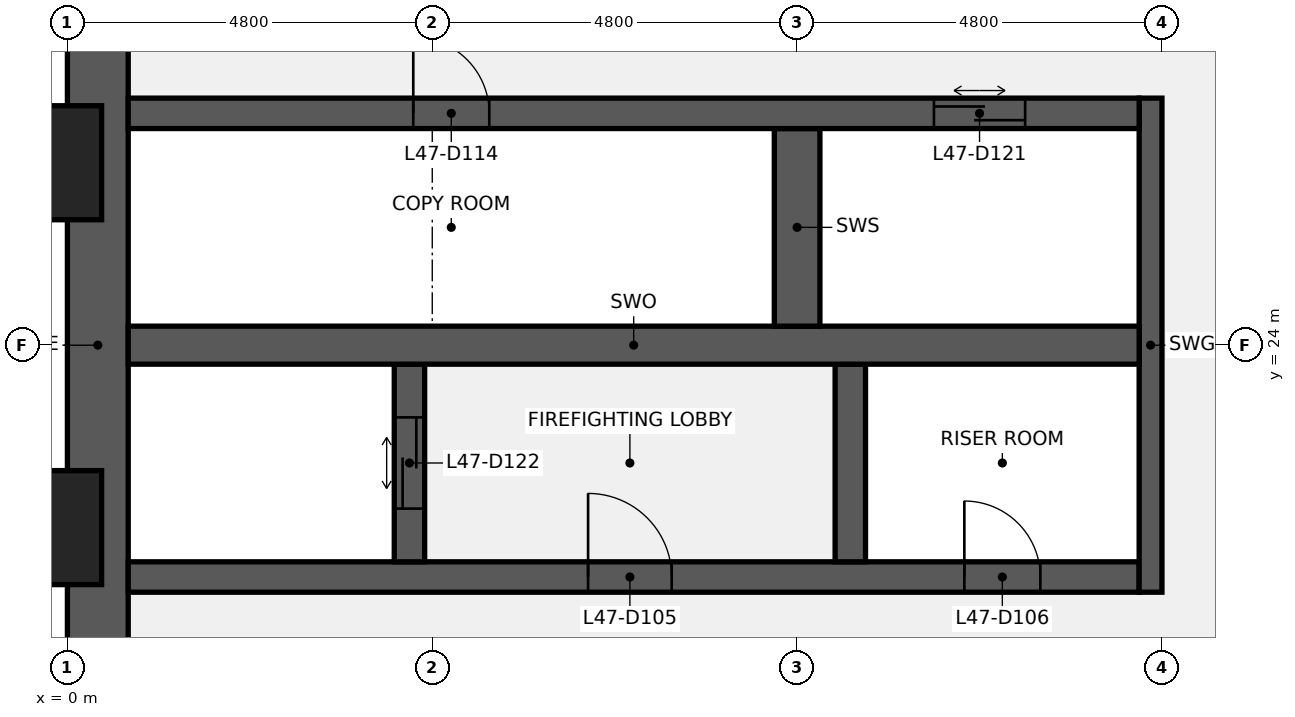
"""IFC4 building model, lengths in metres.
Left out: names, types, materials, properties, quantities, classifications, styles, units other than length and angle.
Written with IfcOpenShell. Run it as: python <this file> out.ifc"""

import sys

from ifc_helpers import new_model, si_unit, direction, frame, frame_2d, origin, origin_2d, place, context, subcontext, project, spatial, rectangle, extrude, element, fill, save


model = new_model("IFC4")
c1 = context("Model", 3, precision=1e-05, world=origin(), true_north=direction((0.0, 1.0)))
c2 = subcontext(c1, "Body", "Model", "MODEL_VIEW")
j1 = project(units=[si_unit("LENGTHUNIT", "METRE"), si_unit("PLANEANGLEUNIT", "RADIAN")], contexts=[c1])
p1 = place(None, origin())
s1 = spatial("IfcSite", under=j1, at=p1, CompositionType="ELEMENT")
p2 = place(p1, origin())
s2 = spatial("IfcBuilding", under=s1, at=p2, CompositionType="ELEMENT")
p3 = place(p2, frame((0.0, 0.0, 217.2)))
s3 = spatial("IfcBuildingStorey", under=s2, at=p3, CompositionType="ELEMENT", Elevation=217.2)
p4 = place(p3, frame((0.4, 9.6, 0.0), z_axis=(0.0, 0.0, 1.0), x_axis=(0.0, 1.0, 0.0)))
e1 = element("IfcWall", 1, at=p4, inside=s3, PredefinedType="SHEAR", context=c2, shape_type="SweptSolid", body=[
    extrude(rectangle(XDim=28.8, YDim=0.8, at=frame_2d((14.4, 0.0))), origin(), (0.0, 0.0, 1.0), 3.84),
])
p5 = place(p4, frame((8.85, 0.0, 0.9)))
e2 = element("IfcOpeningElement", 2, at=p5, cuts=e1, PredefinedType="OPENING", context=c2, shape_type="SweptSolid", body=[
    extrude(rectangle(XDim=1.5, YDim=1.5, at=frame_2d((0.75, 0.75))), frame((0.0, 0.41, 0.0), z_axis=(0.0, -1.0, 0.0), x_axis=(1.0, 0.0, 0.0)), (0.0, 0.0, 1.0), 0.82),
])
p6 = place(p4, frame((18.45, 0.0, 0.9)))
e3 = element("IfcOpeningElement", 3, at=p6, cuts=e1, PredefinedType="OPENING", context=c2, shape_type="SweptSolid", body=[
    extrude(rectangle(XDim=1.5, YDim=1.5, at=frame_2d((0.75, 0.75))), frame((0.0, 0.41, 0.0), z_axis=(0.0, -1.0, 0.0), x_axis=(1.0, 0.0, 0.0)), (0.0, 0.0, 1.0), 0.82),
])
p7 = place(p3, frame((0.8, 20.95, 0.0), z_axis=(0.0, 0.0, 1.0), x_axis=(1.0, 0.0, 0.0)))
e4 = element("IfcWall", 4, at=p7, inside=s3, PredefinedType="SHEAR", context=c2, shape_type="SweptSolid", body=[
    extrude(rectangle(XDim=13.3, YDim=0.4, at=frame_2d((6.65, 0.0))), origin(), (0.0, 0.0, 1.0), 3.84),
])
p8 = place(p7, frame((6.05, 0.0, 0.0)))
e5 = element("IfcOpeningElement", 5, at=p8, cuts=e4, PredefinedType="OPENING", context=c2, shape_type="SweptSolid", body=[
    extrude(rectangle(XDim=1.1, YDim=2.1, at=frame_2d((0.55, 1.05))), frame((0.0, 0.21, 0.0), z_axis=(0.0, -1.0, 0.0), x_axis=(1.0, 0.0, 0.0)), (0.0, 0.0, 1.0), 0.42),
])
p9 = place(p7, frame((11.0, 0.0, 0.0)))
e6 = element("IfcOpeningElement", 6, at=p9, cuts=e4, PredefinedType="OPENING", context=c2, shape_type="SweptSolid", body=[
    extrude(rectangle(XDim=1.0, YDim=2.1, at=frame_2d((0.5, 1.05))), frame((0.0, 0.21, 0.0), z_axis=(0.0, -1.0, 0.0), x_axis=(1.0, 0.0, 0.0)), (0.0, 0.0, 1.0), 0.42),
])
p10 = place(p3, frame((14.25, 20.75, 0.0), z_axis=(0.0, 0.0, 1.0), x_axis=(0.0, 1.0, 0.0)))
e7 = element("IfcWall", 7, at=p10, inside=s3, PredefinedType="SHEAR", context=c2, shape_type="SweptSolid", body=[
    extrude(rectangle(XDim=6.5, YDim=0.3, at=frame_2d((3.25, 0.0))), origin(), (0.0, 0.0, 1.0), 3.84),
])
p11 = place(p3, frame((4.5, 21.15, 0.0), z_axis=(0.0, 0.0, 1.0), x_axis=(0.0, 1.0, 0.0)))
e8 = element("IfcWall", 8, at=p11, inside=s3, PredefinedType="SHEAR", context=c2, shape_type="SweptSolid", body=[
    extrude(rectangle(XDim=2.6, YDim=0.4, at=frame_2d((1.3, 0.0))), origin(), (0.0, 0.0, 1.0), 3.84),
])
p12 = place(p11, frame((0.7, 0.0, 0.0)))
e9 = element("IfcOpeningElement", 9, at=p12, cuts=e8, PredefinedType="OPENING", context=c2, shape_type="SweptSolid", body=[
    extrude(rectangle(XDim=1.2, YDim=2.1, at=frame_2d((0.6, 1.05))), frame((0.0, 0.21, 0.0), z_axis=(0.0, -1.0, 0.0), x_axis=(1.0, 0.0, 0.0)), (0.0, 0.0, 1.0), 0.42),
])
p13 = place(p3, frame((10.3, 21.15, 0.0), z_axis=(0.0, 0.0, 1.0), x_axis=(0.0, 1.0, 0.0)))
e10 = element("IfcWall", 10, at=p13, inside=s3, PredefinedType="SHEAR", context=c2, shape_type="SweptSolid", body=[
    extrude(rectangle(XDim=2.6, YDim=0.4, at=frame_2d((1.3, 0.0))), origin(), (0.0, 0.0, 1.0), 3.84),
])
p14 = place(p3, frame((0.8, 24.0, 0.0), z_axis=(0.0, 0.0, 1.0), x_axis=(1.0, 0.0, 0.0)))
e11 = element("IfcWall", 11, at=p14, inside=s3, PredefinedType="SHEAR", context=c2, shape_type="SweptSolid", body=[
    extrude(rectangle(XDim=13.3, YDim=0.5, at=frame_2d((6.65, 0.0))), origin(), (0.0, 0.0, 1.0), 3.84),
])
p15 = place(p3, frame((9.6, 24.25, 0.0), z_axis=(0.0, 0.0, 1.0), x_axis=(0.0, 1.0, 0.0)))
e12 = element("IfcWall", 12, at=p15, inside=s3, PredefinedType="SHEAR", context=c2, shape_type="SweptSolid", body=[
    extrude(rectangle(XDim=2.6, YDim=0.6, at=frame_2d((1.3, 0.0))), origin(), (0.0, 0.0, 1.0), 3.84),
])
p16 = place(p3, frame((0.8, 27.05, 0.0), z_axis=(0.0, 0.0, 1.0), x_axis=(1.0, 0.0, 0.0)))
e13 = element("IfcWall", 13, at=p16, inside=s3, PredefinedType="SHEAR", context=c2, shape_type="SweptSolid", body=[
    extrude(rectangle(XDim=13.3, YDim=0.4, at=frame_2d((6.65, 0.0))), origin(), (0.0, 0.0, 1.0), 3.84),
])
p17 = place(p16, frame((3.75, 0.0, 0.0)))
e14 = element("IfcOpeningElement", 14, at=p17, cuts=e13, PredefinedType="OPENING", context=c2, shape_type="SweptSolid", body=[
    extrude(rectangle(XDim=1.0, YDim=2.1, at=frame_2d((0.5, 1.05))), frame((0.0, 0.21, 0.0), z_axis=(0.0, -1.0, 0.0), x_axis=(1.0, 0.0, 0.0)), (0.0, 0.0, 1.0), 0.42),
])
p18 = place(p16, frame((10.6, 0.0, 0.0)))
e15 = element("IfcOpeningElement", 15, at=p18, cuts=e13, PredefinedType="OPENING", context=c2, shape_type="SweptSolid", body=[
    extrude(rectangle(XDim=1.2, YDim=2.1, at=frame_2d((0.6, 1.05))), frame((0.0, 0.21, 0.0), z_axis=(0.0, -1.0, 0.0), x_axis=(1.0, 0.0, 0.0)), (0.0, 0.0, 1.0), 0.42),
])
for number, where, z_axis, x_axis in (
    (16, (-0.75, 21.6, 0.0), (0.0, 0.0, 1.0), (0.0, 1.0, 0.0)),
    (17, (-0.75, 26.4, 0.0), (0.0, 0.0, 1.0), (0.0, 1.0, 0.0)),
):
    element("IfcColumn", number, at=place(p3, frame(where, z_axis=z_axis, x_axis=x_axis)), inside=s3, PredefinedType="PILASTER", context=c2, shape_type="SweptSolid", body=[
        extrude(rectangle(XDim=2.4, YDim=1.5, at=origin_2d()), origin(), (0.0, 0.0, 1.0), 4.0),
    ])
p19 = place(p8, origin())
e18 = element("IfcDoor", 18, at=p19, inside=s3, OperationType="SINGLE_SWING_LEFT", PredefinedType="DOOR", context=c2, shape_type="SweptSolid", body=[
    extrude(rectangle(XDim=1.1, YDim=2.1, at=frame_2d((0.55, 1.05))), frame((0.0, 0.025, 0.0), z_axis=(0.0, -1.0, 0.0), x_axis=(1.0, 0.0, 0.0)), (0.0, 0.0, 1.0), 0.05),
])
fill(e5, e18)
p20 = place(p9, origin())
e19 = element("IfcDoor", 19, at=p20, inside=s3, OperationType="SINGLE_SWING_LEFT", PredefinedType="DOOR", context=c2, shape_type="SweptSolid", body=[
    extrude(rectangle(XDim=1.0, YDim=2.1, at=frame_2d((0.5, 1.05))), frame((0.0, 0.025, 0.0), z_axis=(0.0, -1.0, 0.0), x_axis=(1.0, 0.0, 0.0)), (0.0, 0.0, 1.0), 0.05),
])
fill(e6, e19)
p21 = place(p17, origin())
e20 = element("IfcDoor", 20, at=p21, inside=s3, OperationType="SINGLE_SWING_LEFT", PredefinedType="DOOR", context=c2, shape_type="SweptSolid", body=[
    extrude(rectangle(XDim=1.0, YDim=2.1, at=frame_2d((0.5, 1.05))), frame((0.0, 0.025, 0.0), z_axis=(0.0, -1.0, 0.0), x_axis=(1.0, 0.0, 0.0)), (0.0, 0.0, 1.0), 0.05),
])
fill(e14, e20)
p22 = place(p18, origin())
e21 = element("IfcDoor", 21, at=p22, inside=s3, OperationType="DOUBLE_DOOR_SLIDING", PredefinedType="DOOR", context=c2, shape_type="SweptSolid", body=[
    extrude(rectangle(XDim=1.2, YDim=2.1, at=frame_2d((0.6, 1.05))), frame((0.0, 0.025, 0.0), z_axis=(0.0, -1.0, 0.0), x_axis=(1.0, 0.0, 0.0)), (0.0, 0.0, 1.0), 0.05),
])
fill(e15, e21)
p23 = place(p12, origin())
e22 = element("IfcDoor", 22, at=p23, inside=s3, OperationType="DOUBLE_DOOR_SLIDING", PredefinedType="DOOR", context=c2, shape_type="SweptSolid", body=[
    extrude(rectangle(XDim=1.2, YDim=2.1, at=frame_2d((0.6, 1.05))), frame((0.0, 0.025, 0.0), z_axis=(0.0, -1.0, 0.0), x_axis=(1.0, 0.0, 0.0)), (0.0, 0.0, 1.0), 0.05),
])
fill(e9, e22)
save(model, sys.argv[1])
